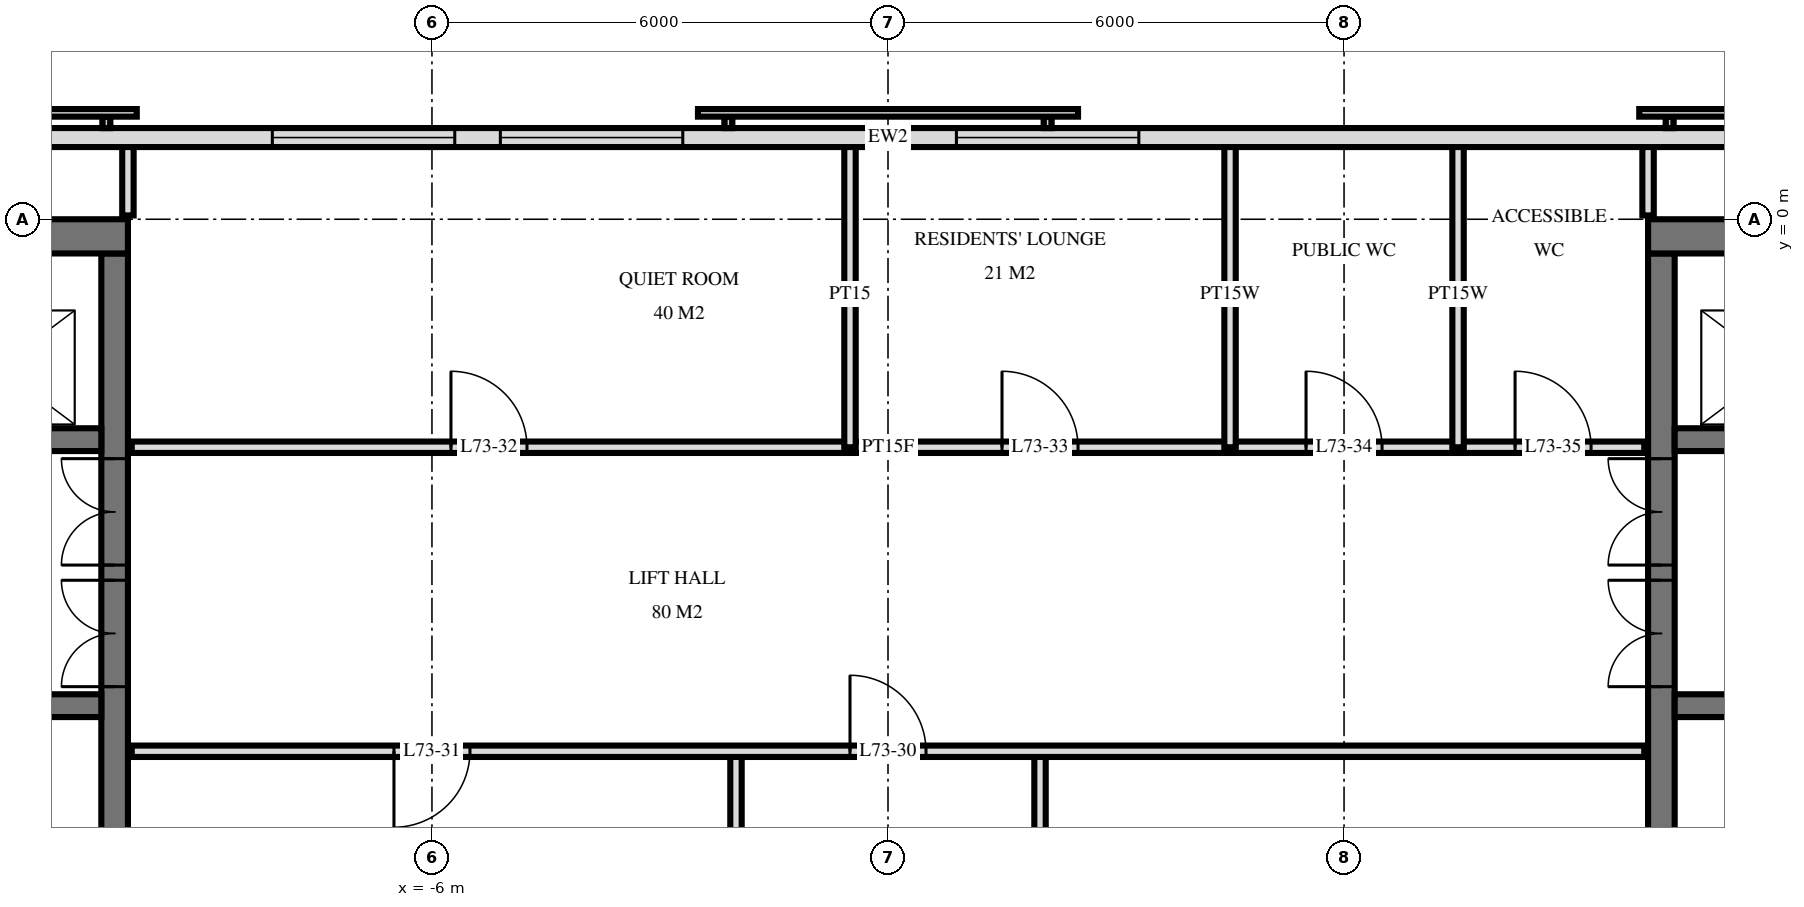
"""IFC4 building model, lengths in metres.
Left out: names, types, materials, properties, quantities, classifications, styles, units other than length and angle.
Written with IfcOpenShell. Run it as: python <this file> out.ifc"""

import sys

from ifc_helpers import new_model, si_unit, direction, frame, frame_2d, origin, place, context, subcontext, project, spatial, rectangle, extrude, element, fill, save


model = new_model("IFC4")
c1 = context("Model", 3, precision=1e-05, world=origin(), true_north=direction((0.0, 1.0)))
c2 = subcontext(c1, "Body", "Model", "MODEL_VIEW")
j1 = project(units=[si_unit("LENGTHUNIT", "METRE"), si_unit("PLANEANGLEUNIT", "RADIAN")], contexts=[c1])
p1 = place(None, origin())
s1 = spatial("IfcSite", under=j1, at=p1, CompositionType="ELEMENT")
p2 = place(p1, origin())
s2 = spatial("IfcBuilding", under=s1, at=p2, CompositionType="ELEMENT")
p3 = place(p2, frame((0.0, 0.0, 277.1)))
s3 = spatial("IfcBuildingStorey", under=s2, at=p3, CompositionType="ELEMENT", Elevation=277.1)
p4 = place(p3, frame((-19.5, -0.225, 0.0), z_axis=(0.0, 0.0, 1.0), x_axis=(1.0, 0.0, 0.0)))
e1 = element("IfcWall", 1, at=p4, inside=s3, PredefinedType="SHEAR", context=c2, shape_type="SweptSolid", body=[
    extrude(rectangle(XDim=9.5, YDim=0.45, at=frame_2d((4.75, 0.0))), origin(), (0.0, 0.0, 1.0), 3.5),
])
p5 = place(p3, frame((-10.175, -14.55, 0.0), z_axis=(0.0, 0.0, 1.0), x_axis=(0.0, 1.0, 0.0)))
e2 = element("IfcWall", 2, at=p5, inside=s3, PredefinedType="SHEAR", context=c2, shape_type="SweptSolid", body=[
    extrude(rectangle(XDim=14.1, YDim=0.35, at=frame_2d((7.05, 0.0))), origin(), (0.0, 0.0, 1.0), 3.5),
])
p6 = place(p5, frame((8.4, 0.0, 0.0)))
e3 = element("IfcOpeningElement", 3, at=p6, cuts=e2, PredefinedType="OPENING", context=c2, shape_type="SweptSolid", body=[
    extrude(rectangle(XDim=1.4, YDim=2.4, at=frame_2d((0.7, 1.2))), frame((0.0, 0.185, 0.0), z_axis=(0.0, -1.0, 0.0), x_axis=(1.0, 0.0, 0.0)), (0.0, 0.0, 1.0), 0.37),
])
p7 = place(p5, frame((10.0, 0.0, 0.0)))
e4 = element("IfcOpeningElement", 4, at=p7, cuts=e2, PredefinedType="OPENING", context=c2, shape_type="SweptSolid", body=[
    extrude(rectangle(XDim=1.4, YDim=2.4, at=frame_2d((0.7, 1.2))), frame((0.0, 0.185, 0.0), z_axis=(0.0, -1.0, 0.0), x_axis=(1.0, 0.0, 0.0)), (0.0, 0.0, 1.0), 0.37),
])
p8 = place(p5, frame((4.0, 0.0, 0.0)))
e5 = element("IfcOpeningElement", 5, at=p8, cuts=e2, PredefinedType="OPENING", context=c2, shape_type="SweptSolid", body=[
    extrude(rectangle(XDim=1.2, YDim=2.1, at=frame_2d((0.6, 1.05))), frame((0.0, 0.185, 0.0), z_axis=(0.0, -1.0, 0.0), x_axis=(1.0, 0.0, 0.0)), (0.0, 0.0, 1.0), 0.37),
])
p9 = place(p3, frame((-19.05, -2.9, 0.0), z_axis=(0.0, 0.0, 1.0), x_axis=(1.0, 0.0, 0.0)))
e6 = element("IfcWall", 6, at=p9, inside=s3, PredefinedType="SHEAR", context=c2, shape_type="SweptSolid", body=[
    extrude(rectangle(XDim=8.7, YDim=0.3, at=frame_2d((4.35, 0.0))), origin(), (0.0, 0.0, 1.0), 3.5),
])
p10 = place(p9, frame((6.8, 0.0, 0.0)))
e7 = element("IfcOpeningElement", 7, at=p10, cuts=e6, PredefinedType="OPENING", context=c2, shape_type="SweptSolid", body=[
    extrude(rectangle(XDim=1.1, YDim=2.1, at=frame_2d((0.55, 1.05))), frame((0.0, 0.16, 0.0), z_axis=(0.0, -1.0, 0.0), x_axis=(1.0, 0.0, 0.0)), (0.0, 0.0, 1.0), 0.32),
])
p11 = place(p9, frame((3.8, 0.0, 0.0)))
e8 = element("IfcOpeningElement", 8, at=p11, cuts=e6, PredefinedType="OPENING", context=c2, shape_type="SweptSolid", body=[
    extrude(rectangle(XDim=1.1, YDim=2.1, at=frame_2d((0.55, 1.05))), frame((0.0, 0.16, 0.0), z_axis=(0.0, -1.0, 0.0), x_axis=(1.0, 0.0, 0.0)), (0.0, 0.0, 1.0), 0.32),
])
p12 = place(p9, frame((0.9, 0.0, 0.0)))
e9 = element("IfcOpeningElement", 9, at=p12, cuts=e6, PredefinedType="OPENING", context=c2, shape_type="SweptSolid", body=[
    extrude(rectangle(XDim=0.9, YDim=2.1, at=frame_2d((0.45, 1.05))), frame((0.0, 0.16, 0.0), z_axis=(0.0, -1.0, 0.0), x_axis=(1.0, 0.0, 0.0)), (0.0, 0.0, 1.0), 0.32),
])
p13 = place(p3, frame((-19.05, -6.4, 0.0), z_axis=(0.0, 0.0, 1.0), x_axis=(1.0, 0.0, 0.0)))
e10 = element("IfcWall", 10, at=p13, inside=s3, PredefinedType="SHEAR", context=c2, shape_type="SweptSolid", body=[
    extrude(rectangle(XDim=8.7, YDim=0.3, at=frame_2d((4.35, 0.0))), origin(), (0.0, 0.0, 1.0), 3.5),
])
p14 = place(p13, frame((0.8, 0.0, 0.0)))
e11 = element("IfcOpeningElement", 11, at=p14, cuts=e10, PredefinedType="OPENING", context=c2, shape_type="SweptSolid", body=[
    extrude(rectangle(XDim=1.1, YDim=2.1, at=frame_2d((0.55, 1.05))), frame((0.0, 0.16, 0.0), z_axis=(0.0, -1.0, 0.0), x_axis=(1.0, 0.0, 0.0)), (0.0, 0.0, 1.0), 0.32),
])
p15 = place(p3, frame((10.0, -0.225, 0.0), z_axis=(0.0, 0.0, 1.0), x_axis=(1.0, 0.0, 0.0)))
e12 = element("IfcWall", 12, at=p15, inside=s3, PredefinedType="SHEAR", context=c2, shape_type="SweptSolid", body=[
    extrude(rectangle(XDim=9.5, YDim=0.45, at=frame_2d((4.75, 0.0))), origin(), (0.0, 0.0, 1.0), 3.5),
])
p16 = place(p3, frame((10.175, -14.55, 0.0), z_axis=(0.0, 0.0, 1.0), x_axis=(0.0, 1.0, 0.0)))
e13 = element("IfcWall", 13, at=p16, inside=s3, PredefinedType="SHEAR", context=c2, shape_type="SweptSolid", body=[
    extrude(rectangle(XDim=14.1, YDim=0.35, at=frame_2d((7.05, 0.0))), origin(), (0.0, 0.0, 1.0), 3.5),
])
p17 = place(p16, frame((8.4, 0.0, 0.0)))
e14 = element("IfcOpeningElement", 14, at=p17, cuts=e13, PredefinedType="OPENING", context=c2, shape_type="SweptSolid", body=[
    extrude(rectangle(XDim=1.4, YDim=2.4, at=frame_2d((0.7, 1.2))), frame((0.0, 0.185, 0.0), z_axis=(0.0, -1.0, 0.0), x_axis=(1.0, 0.0, 0.0)), (0.0, 0.0, 1.0), 0.37),
])
p18 = place(p16, frame((10.0, 0.0, 0.0)))
e15 = element("IfcOpeningElement", 15, at=p18, cuts=e13, PredefinedType="OPENING", context=c2, shape_type="SweptSolid", body=[
    extrude(rectangle(XDim=1.4, YDim=2.4, at=frame_2d((0.7, 1.2))), frame((0.0, 0.185, 0.0), z_axis=(0.0, -1.0, 0.0), x_axis=(1.0, 0.0, 0.0)), (0.0, 0.0, 1.0), 0.37),
])
p19 = place(p16, frame((4.0, 0.0, 0.0)))
e16 = element("IfcOpeningElement", 16, at=p19, cuts=e13, PredefinedType="OPENING", context=c2, shape_type="SweptSolid", body=[
    extrude(rectangle(XDim=1.2, YDim=2.1, at=frame_2d((0.6, 1.05))), frame((0.0, 0.185, 0.0), z_axis=(0.0, -1.0, 0.0), x_axis=(1.0, 0.0, 0.0)), (0.0, 0.0, 1.0), 0.37),
])
p20 = place(p3, frame((10.35, -2.9, 0.0), z_axis=(0.0, 0.0, 1.0), x_axis=(1.0, 0.0, 0.0)))
e17 = element("IfcWall", 17, at=p20, inside=s3, PredefinedType="SHEAR", context=c2, shape_type="SweptSolid", body=[
    extrude(rectangle(XDim=8.7, YDim=0.3, at=frame_2d((4.35, 0.0))), origin(), (0.0, 0.0, 1.0), 3.5),
])
p21 = place(p20, frame((0.8, 0.0, 0.0)))
e18 = element("IfcOpeningElement", 18, at=p21, cuts=e17, PredefinedType="OPENING", context=c2, shape_type="SweptSolid", body=[
    extrude(rectangle(XDim=1.1, YDim=2.1, at=frame_2d((0.55, 1.05))), frame((0.0, 0.16, 0.0), z_axis=(0.0, -1.0, 0.0), x_axis=(1.0, 0.0, 0.0)), (0.0, 0.0, 1.0), 0.32),
])
p22 = place(p20, frame((3.8, 0.0, 0.0)))
e19 = element("IfcOpeningElement", 19, at=p22, cuts=e17, PredefinedType="OPENING", context=c2, shape_type="SweptSolid", body=[
    extrude(rectangle(XDim=1.1, YDim=2.1, at=frame_2d((0.55, 1.05))), frame((0.0, 0.16, 0.0), z_axis=(0.0, -1.0, 0.0), x_axis=(1.0, 0.0, 0.0)), (0.0, 0.0, 1.0), 0.32),
])
p23 = place(p20, frame((6.9, 0.0, 0.0)))
e20 = element("IfcOpeningElement", 20, at=p23, cuts=e17, PredefinedType="OPENING", context=c2, shape_type="SweptSolid", body=[
    extrude(rectangle(XDim=0.9, YDim=2.1, at=frame_2d((0.45, 1.05))), frame((0.0, 0.16, 0.0), z_axis=(0.0, -1.0, 0.0), x_axis=(1.0, 0.0, 0.0)), (0.0, 0.0, 1.0), 0.32),
])
p24 = place(p3, frame((10.35, -6.4, 0.0), z_axis=(0.0, 0.0, 1.0), x_axis=(1.0, 0.0, 0.0)))
e21 = element("IfcWall", 21, at=p24, inside=s3, PredefinedType="SHEAR", context=c2, shape_type="SweptSolid", body=[
    extrude(rectangle(XDim=8.7, YDim=0.3, at=frame_2d((4.35, 0.0))), origin(), (0.0, 0.0, 1.0), 3.5),
])
p25 = place(p24, frame((6.8, 0.0, 0.0)))
e22 = element("IfcOpeningElement", 22, at=p25, cuts=e21, PredefinedType="OPENING", context=c2, shape_type="SweptSolid", body=[
    extrude(rectangle(XDim=1.1, YDim=2.1, at=frame_2d((0.55, 1.05))), frame((0.0, 0.16, 0.0), z_axis=(0.0, -1.0, 0.0), x_axis=(1.0, 0.0, 0.0)), (0.0, 0.0, 1.0), 0.32),
])
p26 = place(p3, frame((18.575, 1.075, 0.0), z_axis=(0.0, 0.0, 1.0), x_axis=(-1.0, 0.0, 0.0)))
e23 = element("IfcWall", 23, at=p26, inside=s3, PredefinedType="SOLIDWALL", context=c2, shape_type="SweptSolid", body=[
    extrude(rectangle(XDim=37.151, YDim=0.25, at=frame_2d((18.575, 0.0))), origin(), (0.0, 0.0, 1.0), 3.22),
])
p27 = place(p26, frame((15.275, 0.0, 0.9)))
e24 = element("IfcOpeningElement", 24, at=p27, cuts=e23, PredefinedType="OPENING", context=c2, shape_type="SweptSolid", body=[
    extrude(rectangle(XDim=2.4, YDim=1.5, at=frame_2d((1.2, 0.75))), frame((0.0, 0.135, 0.0), z_axis=(0.0, -1.0, 0.0), x_axis=(1.0, 0.0, 0.0)), (0.0, 0.0, 1.0), 0.27),
])
p28 = place(p26, frame((21.275, 0.0, 0.9)))
e25 = element("IfcOpeningElement", 25, at=p28, cuts=e23, PredefinedType="OPENING", context=c2, shape_type="SweptSolid", body=[
    extrude(rectangle(XDim=2.4, YDim=1.5, at=frame_2d((1.2, 0.75))), frame((0.0, 0.135, 0.0), z_axis=(0.0, -1.0, 0.0), x_axis=(1.0, 0.0, 0.0)), (0.0, 0.0, 1.0), 0.27),
])
p29 = place(p26, frame((24.275, 0.0, 0.9)))
e26 = element("IfcOpeningElement", 26, at=p29, cuts=e23, PredefinedType="OPENING", context=c2, shape_type="SweptSolid", body=[
    extrude(rectangle(XDim=2.4, YDim=1.5, at=frame_2d((1.2, 0.75))), frame((0.0, 0.135, 0.0), z_axis=(0.0, -1.0, 0.0), x_axis=(1.0, 0.0, 0.0)), (0.0, 0.0, 1.0), 0.27),
])
p30 = place(p3, frame((10.0, 0.05, 0.0), z_axis=(0.0, 0.0, 1.0), x_axis=(0.0, 1.0, 0.0)))
e27 = element("IfcWall", 27, at=p30, inside=s3, PredefinedType="PLUMBINGWALL", context=c2, shape_type="SweptSolid", body=[
    extrude(rectangle(XDim=0.97, YDim=0.15, at=frame_2d((0.485, 0.0))), origin(), (0.0, 0.0, 1.0), 3.22),
])
for number, where, z_axis, x_axis in (
    (28, (7.5, -3.0, 0.0), (0.0, 0.0, 1.0), (0.0, 1.0, 0.0)),
    (29, (4.5, -3.0, 0.0), (0.0, 0.0, 1.0), (0.0, 1.0, 0.0)),
):
    element("IfcWall", number, at=place(p3, frame(where, z_axis=z_axis, x_axis=x_axis)), inside=s3, PredefinedType="PLUMBINGWALL", context=c2, shape_type="SweptSolid", body=[
        extrude(rectangle(XDim=4.02, YDim=0.15, at=frame_2d((2.01, 0.0))), origin(), (0.0, 0.0, 1.0), 3.22),
    ])
p31 = place(p3, frame((2.0, -11.0, 0.0), z_axis=(0.0, 0.0, 1.0), x_axis=(0.0, 1.0, 0.0)))
e30 = element("IfcWall", 30, at=p31, inside=s3, PredefinedType="PARTITIONING", context=c2, shape_type="SweptSolid", body=[
    extrude(rectangle(XDim=4.0, YDim=0.15, at=frame_2d((2.0, 0.0))), origin(), (0.0, 0.0, 1.0), 3.22),
])
p32 = place(p3, frame((-0.5, -3.0, 0.0), z_axis=(0.0, 0.0, 1.0), x_axis=(0.0, 1.0, 0.0)))
e31 = element("IfcWall", 31, at=p32, inside=s3, PredefinedType="PARTITIONING", context=c2, shape_type="SweptSolid", body=[
    extrude(rectangle(XDim=4.02, YDim=0.15, at=frame_2d((2.01, 0.0))), origin(), (0.0, 0.0, 1.0), 3.22),
])
p33 = place(p3, frame((-2.0, -11.0, 0.0), z_axis=(0.0, 0.0, 1.0), x_axis=(0.0, 1.0, 0.0)))
e32 = element("IfcWall", 32, at=p33, inside=s3, PredefinedType="PARTITIONING", context=c2, shape_type="SweptSolid", body=[
    extrude(rectangle(XDim=4.0, YDim=0.15, at=frame_2d((2.0, 0.0))), origin(), (0.0, 0.0, 1.0), 3.22),
])
p34 = place(p3, frame((-10.0, 0.05, 0.0), z_axis=(0.0, 0.0, 1.0), x_axis=(0.0, 1.0, 0.0)))
e33 = element("IfcWall", 33, at=p34, inside=s3, PredefinedType="PARTITIONING", context=c2, shape_type="SweptSolid", body=[
    extrude(rectangle(XDim=0.97, YDim=0.15, at=frame_2d((0.485, 0.0))), origin(), (0.0, 0.0, 1.0), 3.22),
])
p35 = place(p3, frame((-9.95, -7.0, 0.0), z_axis=(0.0, 0.0, 1.0), x_axis=(1.0, 0.0, 0.0)))
e34 = element("IfcWall", 34, at=p35, inside=s3, PredefinedType="PARTITIONING", context=c2, shape_type="SweptSolid", body=[
    extrude(rectangle(XDim=19.9, YDim=0.15, at=frame_2d((9.95, 0.0))), origin(), (0.0, 0.0, 1.0), 3.22),
])
p36 = place(p35, frame((9.45, 0.0, 0.0)))
e35 = element("IfcOpeningElement", 35, at=p36, cuts=e34, PredefinedType="OPENING", context=c2, shape_type="SweptSolid", body=[
    extrude(rectangle(XDim=1.0, YDim=2.1, at=frame_2d((0.5, 1.05))), frame((0.0, 0.085, 0.0), z_axis=(0.0, -1.0, 0.0), x_axis=(1.0, 0.0, 0.0)), (0.0, 0.0, 1.0), 0.17),
])
p37 = place(p35, frame((3.45, 0.0, 0.0)))
e36 = element("IfcOpeningElement", 36, at=p37, cuts=e34, PredefinedType="OPENING", context=c2, shape_type="SweptSolid", body=[
    extrude(rectangle(XDim=1.0, YDim=2.1, at=frame_2d((0.5, 1.05))), frame((0.0, 0.085, 0.0), z_axis=(0.0, -1.0, 0.0), x_axis=(1.0, 0.0, 0.0)), (0.0, 0.0, 1.0), 0.17),
])
p38 = place(p3, frame((-9.95, -3.0, 0.0), z_axis=(0.0, 0.0, 1.0), x_axis=(1.0, 0.0, 0.0)))
e37 = element("IfcWall", 37, at=p38, inside=s3, PredefinedType="PARTITIONING", context=c2, shape_type="SweptSolid", body=[
    extrude(rectangle(XDim=19.9, YDim=0.15, at=frame_2d((9.95, 0.0))), origin(), (0.0, 0.0, 1.0), 3.22),
])
p39 = place(p38, frame((4.2, 0.0, 0.0)))
e38 = element("IfcOpeningElement", 38, at=p39, cuts=e37, PredefinedType="OPENING", context=c2, shape_type="SweptSolid", body=[
    extrude(rectangle(XDim=1.0, YDim=2.1, at=frame_2d((0.5, 1.05))), frame((0.0, 0.085, 0.0), z_axis=(0.0, -1.0, 0.0), x_axis=(1.0, 0.0, 0.0)), (0.0, 0.0, 1.0), 0.17),
])
p40 = place(p38, frame((11.45, 0.0, 0.0)))
e39 = element("IfcOpeningElement", 39, at=p40, cuts=e37, PredefinedType="OPENING", context=c2, shape_type="SweptSolid", body=[
    extrude(rectangle(XDim=1.0, YDim=2.1, at=frame_2d((0.5, 1.05))), frame((0.0, 0.085, 0.0), z_axis=(0.0, -1.0, 0.0), x_axis=(1.0, 0.0, 0.0)), (0.0, 0.0, 1.0), 0.17),
])
p41 = place(p38, frame((15.45, 0.0, 0.0)))
e40 = element("IfcOpeningElement", 40, at=p41, cuts=e37, PredefinedType="OPENING", context=c2, shape_type="SweptSolid", body=[
    extrude(rectangle(XDim=1.0, YDim=2.1, at=frame_2d((0.5, 1.05))), frame((0.0, 0.085, 0.0), z_axis=(0.0, -1.0, 0.0), x_axis=(1.0, 0.0, 0.0)), (0.0, 0.0, 1.0), 0.17),
])
p42 = place(p38, frame((18.2, 0.0, 0.0)))
e41 = element("IfcOpeningElement", 41, at=p42, cuts=e37, PredefinedType="OPENING", context=c2, shape_type="SweptSolid", body=[
    extrude(rectangle(XDim=1.0, YDim=2.1, at=frame_2d((0.5, 1.05))), frame((0.0, 0.085, 0.0), z_axis=(0.0, -1.0, 0.0), x_axis=(1.0, 0.0, 0.0)), (0.0, 0.0, 1.0), 0.17),
])
p43 = place(p27, origin())
e42 = element("IfcWindow", 42, at=p43, inside=s3, PartitioningType="SINGLE_PANEL", PredefinedType="WINDOW", context=c2, shape_type="SweptSolid", body=[
    extrude(rectangle(XDim=2.4, YDim=1.5, at=frame_2d((1.2, 0.75))), frame((0.0, 0.03, 0.0), z_axis=(0.0, -1.0, 0.0), x_axis=(1.0, 0.0, 0.0)), (0.0, 0.0, 1.0), 0.06),
])
fill(e24, e42)
p44 = place(p28, origin())
e43 = element("IfcWindow", 43, at=p44, inside=s3, PartitioningType="SINGLE_PANEL", PredefinedType="WINDOW", context=c2, shape_type="SweptSolid", body=[
    extrude(rectangle(XDim=2.4, YDim=1.5, at=frame_2d((1.2, 0.75))), frame((0.0, 0.03, 0.0), z_axis=(0.0, -1.0, 0.0), x_axis=(1.0, 0.0, 0.0)), (0.0, 0.0, 1.0), 0.06),
])
fill(e25, e43)
p45 = place(p29, origin())
e44 = element("IfcWindow", 44, at=p45, inside=s3, PartitioningType="SINGLE_PANEL", PredefinedType="WINDOW", context=c2, shape_type="SweptSolid", body=[
    extrude(rectangle(XDim=2.4, YDim=1.5, at=frame_2d((1.2, 0.75))), frame((0.0, 0.03, 0.0), z_axis=(0.0, -1.0, 0.0), x_axis=(1.0, 0.0, 0.0)), (0.0, 0.0, 1.0), 0.06),
])
fill(e26, e44)
p46 = place(p6, origin())
e45 = element("IfcDoor", 45, at=p46, inside=s3, OperationType="DOUBLE_DOOR_SINGLE_SWING", PredefinedType="DOOR", context=c2, shape_type="SweptSolid", body=[
    extrude(rectangle(XDim=1.4, YDim=2.4, at=frame_2d((0.7, 1.2))), frame((0.0, 0.025, 0.0), z_axis=(0.0, -1.0, 0.0), x_axis=(1.0, 0.0, 0.0)), (0.0, 0.0, 1.0), 0.05),
])
fill(e3, e45)
p47 = place(p7, origin())
e46 = element("IfcDoor", 46, at=p47, inside=s3, OperationType="DOUBLE_DOOR_SINGLE_SWING", PredefinedType="DOOR", context=c2, shape_type="SweptSolid", body=[
    extrude(rectangle(XDim=1.4, YDim=2.4, at=frame_2d((0.7, 1.2))), frame((0.0, 0.025, 0.0), z_axis=(0.0, -1.0, 0.0), x_axis=(1.0, 0.0, 0.0)), (0.0, 0.0, 1.0), 0.05),
])
fill(e4, e46)
p48 = place(p17, origin())
e47 = element("IfcDoor", 47, at=p48, inside=s3, OperationType="DOUBLE_DOOR_SINGLE_SWING", PredefinedType="DOOR", context=c2, shape_type="SweptSolid", body=[
    extrude(rectangle(XDim=1.4, YDim=2.4, at=frame_2d((0.7, 1.2))), frame((0.0, 0.025, 0.0), z_axis=(0.0, -1.0, 0.0), x_axis=(1.0, 0.0, 0.0)), (0.0, 0.0, 1.0), 0.05),
])
fill(e14, e47)
p49 = place(p18, origin())
e48 = element("IfcDoor", 48, at=p49, inside=s3, OperationType="DOUBLE_DOOR_SINGLE_SWING", PredefinedType="DOOR", context=c2, shape_type="SweptSolid", body=[
    extrude(rectangle(XDim=1.4, YDim=2.4, at=frame_2d((0.7, 1.2))), frame((0.0, 0.025, 0.0), z_axis=(0.0, -1.0, 0.0), x_axis=(1.0, 0.0, 0.0)), (0.0, 0.0, 1.0), 0.05),
])
fill(e15, e48)
p50 = place(p36, origin())
e49 = element("IfcDoor", 49, at=p50, inside=s3, OperationType="SINGLE_SWING_RIGHT", PredefinedType="DOOR", context=c2, shape_type="SweptSolid", body=[
    extrude(rectangle(XDim=1.0, YDim=2.1, at=frame_2d((0.5, 1.05))), frame((0.0, 0.025, 0.0), z_axis=(0.0, -1.0, 0.0), x_axis=(1.0, 0.0, 0.0)), (0.0, 0.0, 1.0), 0.05),
])
fill(e35, e49)
p51 = place(p37, frame((0.5, 0.0, 0.0), z_axis=(0.0, 0.0, 1.0), x_axis=(-1.0, 0.0, 0.0)))
e50 = element("IfcDoor", 50, at=p51, inside=s3, OperationType="SINGLE_SWING_LEFT", PredefinedType="DOOR", context=c2, shape_type="SweptSolid", body=[
    extrude(rectangle(XDim=1.0, YDim=2.1, at=frame_2d((0.0, 1.05))), frame((0.0, -0.025, 0.0), z_axis=(0.0, 1.0, 0.0), x_axis=(-1.0, 0.0, 0.0)), (0.0, 0.0, 1.0), 0.05),
])
fill(e36, e50)
p52 = place(p39, origin())
e51 = element("IfcDoor", 51, at=p52, inside=s3, OperationType="SINGLE_SWING_RIGHT", PredefinedType="DOOR", context=c2, shape_type="SweptSolid", body=[
    extrude(rectangle(XDim=1.0, YDim=2.1, at=frame_2d((0.5, 1.05))), frame((0.0, 0.025, 0.0), z_axis=(0.0, -1.0, 0.0), x_axis=(1.0, 0.0, 0.0)), (0.0, 0.0, 1.0), 0.05),
])
fill(e38, e51)
p53 = place(p40, origin())
e52 = element("IfcDoor", 52, at=p53, inside=s3, OperationType="SINGLE_SWING_RIGHT", PredefinedType="DOOR", context=c2, shape_type="SweptSolid", body=[
    extrude(rectangle(XDim=1.0, YDim=2.1, at=frame_2d((0.5, 1.05))), frame((0.0, 0.025, 0.0), z_axis=(0.0, -1.0, 0.0), x_axis=(1.0, 0.0, 0.0)), (0.0, 0.0, 1.0), 0.05),
])
fill(e39, e52)
p54 = place(p41, origin())
e53 = element("IfcDoor", 53, at=p54, inside=s3, OperationType="SINGLE_SWING_RIGHT", PredefinedType="DOOR", context=c2, shape_type="SweptSolid", body=[
    extrude(rectangle(XDim=1.0, YDim=2.1, at=frame_2d((0.5, 1.05))), frame((0.0, 0.025, 0.0), z_axis=(0.0, -1.0, 0.0), x_axis=(1.0, 0.0, 0.0)), (0.0, 0.0, 1.0), 0.05),
])
fill(e40, e53)
p55 = place(p42, origin())
e54 = element("IfcDoor", 54, at=p55, inside=s3, OperationType="SINGLE_SWING_RIGHT", PredefinedType="DOOR", context=c2, shape_type="SweptSolid", body=[
    extrude(rectangle(XDim=1.0, YDim=2.1, at=frame_2d((0.5, 1.05))), frame((0.0, 0.025, 0.0), z_axis=(0.0, -1.0, 0.0), x_axis=(1.0, 0.0, 0.0)), (0.0, 0.0, 1.0), 0.05),
])
fill(e41, e54)
save(model, sys.argv[1])
